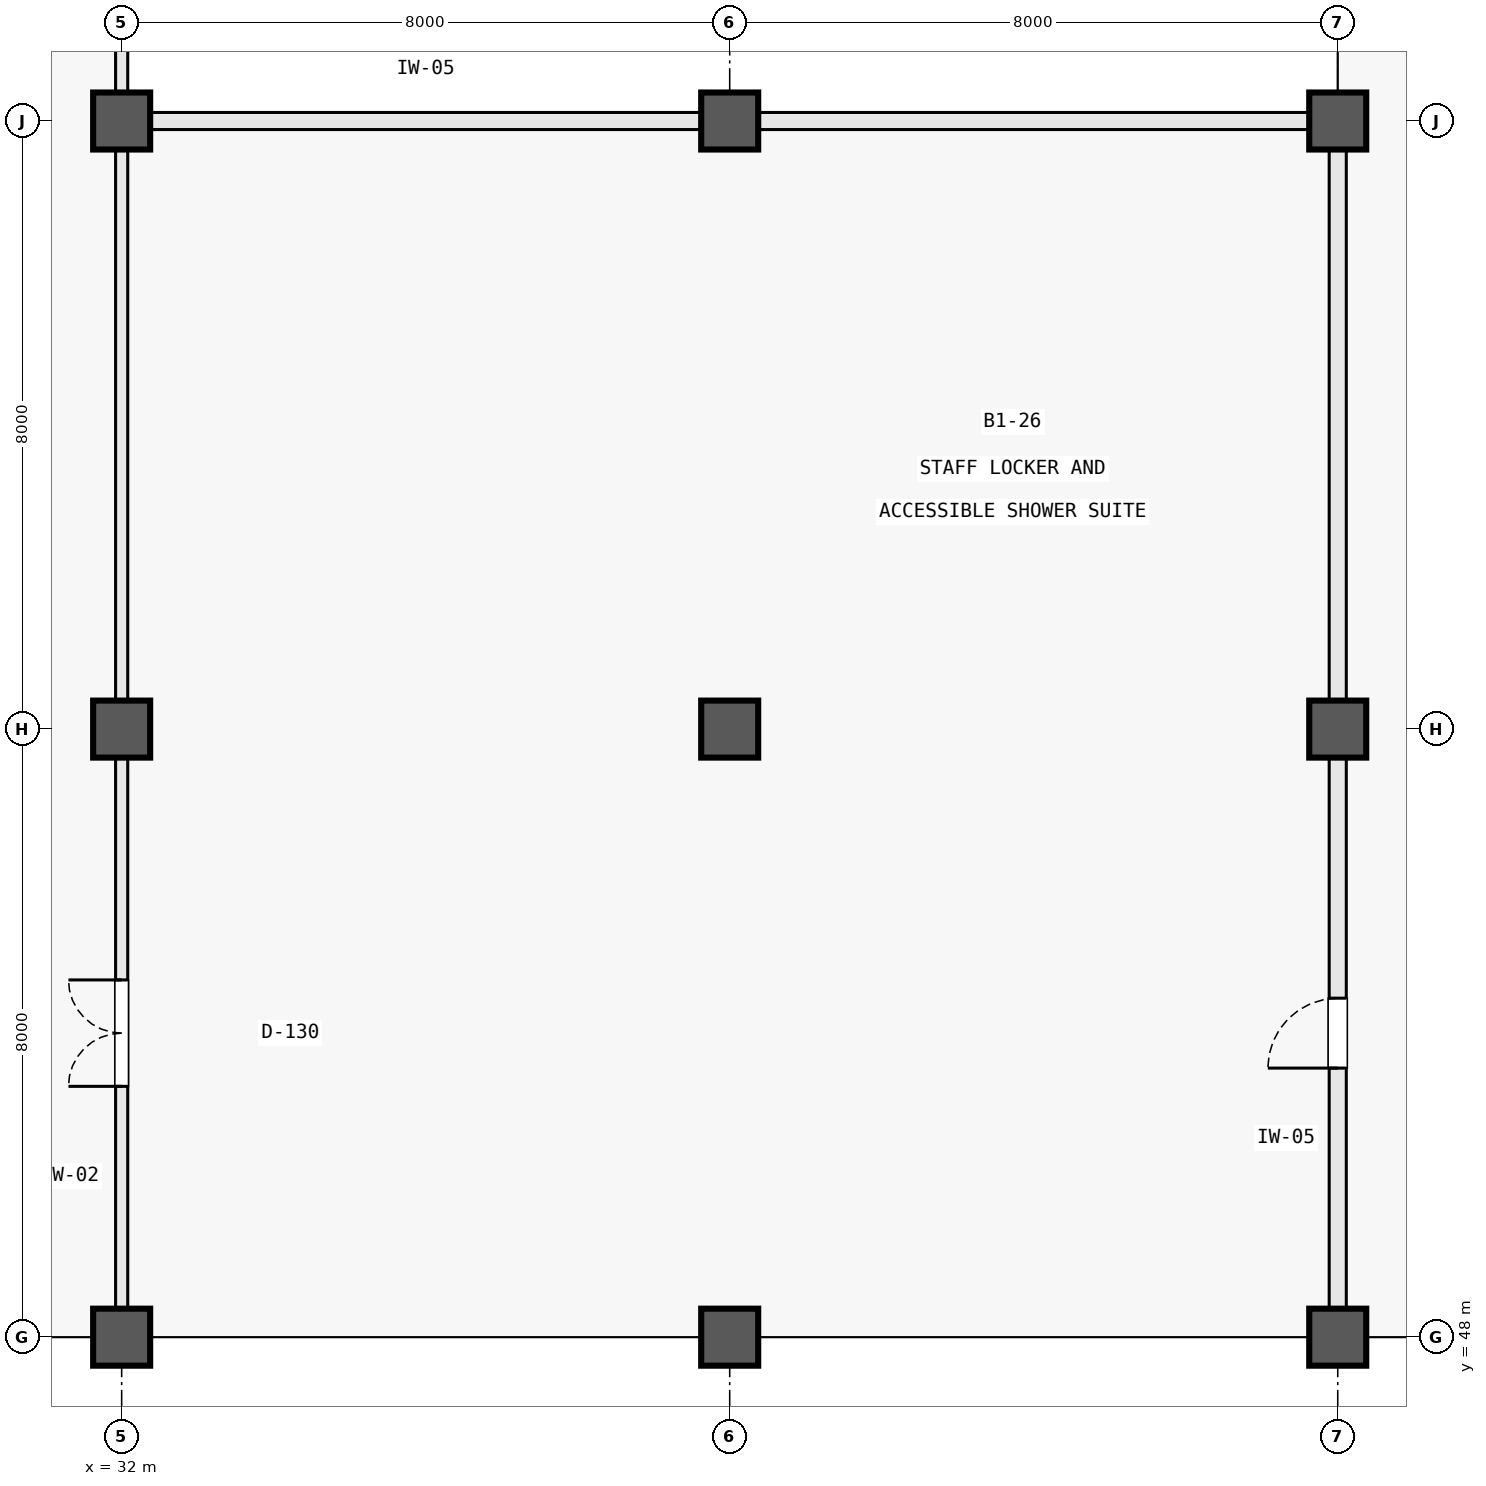
"""IFC4 building model, lengths in metres.
Left out: names, types, materials, properties, quantities, classifications, styles, units other than length and angle.
Written with IfcOpenShell. Run it as: python <this file> out.ifc"""

import sys

from ifc_helpers import new_model, si_unit, direction, frame, frame_2d, origin, origin_2d, place, context, subcontext, project, spatial, rectangle, extrude, element, fill, save


model = new_model("IFC4")
c1 = context("Model", 3, precision=1e-05, world=origin(), true_north=direction((0.0, 1.0)))
c2 = subcontext(c1, "Body", "Model", "MODEL_VIEW")
j1 = project(units=[si_unit("LENGTHUNIT", "METRE"), si_unit("PLANEANGLEUNIT", "RADIAN")], contexts=[c1])
p1 = place(None, origin())
s1 = spatial("IfcSite", under=j1, at=p1, CompositionType="ELEMENT")
p2 = place(p1, origin())
s2 = spatial("IfcBuilding", under=s1, at=p2, CompositionType="ELEMENT")
p3 = place(p2, frame((0.0, 0.0, -5.4)))
s3 = spatial("IfcBuildingStorey", under=s2, at=p3, CompositionType="ELEMENT", Elevation=-5.4)
for number, where, z_axis, x_axis in (
    (1, (32.0, 48.0, 0.0), (0.0, 0.0, 1.0), (1.0, 0.0, 0.0)),
    (2, (32.0, 56.0, 0.0), (0.0, 0.0, 1.0), (1.0, 0.0, 0.0)),
    (3, (32.0, 64.0, 0.0), (0.0, 0.0, 1.0), (1.0, 0.0, 0.0)),
    (4, (40.0, 48.0, 0.0), (0.0, 0.0, 1.0), (1.0, 0.0, 0.0)),
    (5, (40.0, 56.0, 0.0), (0.0, 0.0, 1.0), (1.0, 0.0, 0.0)),
    (6, (40.0, 64.0, 0.0), (0.0, 0.0, 1.0), (1.0, 0.0, 0.0)),
    (7, (48.0, 48.0, 0.0), (0.0, 0.0, 1.0), (1.0, 0.0, 0.0)),
    (8, (48.0, 56.0, 0.0), (0.0, 0.0, 1.0), (1.0, 0.0, 0.0)),
    (9, (48.0, 64.0, 0.0), (0.0, 0.0, 1.0), (1.0, 0.0, 0.0)),
):
    element("IfcColumn", number, at=place(p3, frame(where, z_axis=z_axis, x_axis=x_axis)), inside=s3, PredefinedType="COLUMN", context=c2, shape_type="SweptSolid", body=[
        extrude(rectangle(XDim=0.75, YDim=0.75, at=origin_2d()), origin(), (0.0, 0.0, 1.0), 5.4),
    ])
p4 = place(p3, frame((32.0, 48.385, 0.0), z_axis=(0.0, 0.0, 1.0), x_axis=(0.0, 1.0, 0.0)))
e10 = element("IfcWall", 10, at=p4, inside=s3, PredefinedType="PARTITIONING", context=c2, shape_type="SweptSolid", body=[
    extrude(rectangle(XDim=7.23, YDim=0.16, at=frame_2d((3.615, 0.0))), origin(), (0.0, 0.0, 1.0), 3.83),
])
p5 = place(p4, frame((2.915, 0.0, 0.0)))
e11 = element("IfcOpeningElement", 11, at=p5, cuts=e10, PredefinedType="OPENING", context=c2, shape_type="SweptSolid", body=[
    extrude(rectangle(XDim=1.4, YDim=2.2, at=frame_2d((0.7, 1.1))), frame((0.0, 0.092, 0.0), z_axis=(0.0, -1.0, 0.0), x_axis=(1.0, 0.0, 0.0)), (0.0, 0.0, 1.0), 0.184),
])
p6 = place(p3, frame((32.0, 56.385, 0.0), z_axis=(0.0, 0.0, 1.0), x_axis=(0.0, 1.0, 0.0)))
e12 = element("IfcWall", 12, at=p6, inside=s3, PredefinedType="PARTITIONING", context=c2, shape_type="SweptSolid", body=[
    extrude(rectangle(XDim=7.23, YDim=0.16, at=frame_2d((3.615, 0.0))), origin(), (0.0, 0.0, 1.0), 3.83),
])
p7 = place(p3, frame((32.0, 64.385, 0.0), z_axis=(0.0, 0.0, 1.0), x_axis=(0.0, 1.0, 0.0)))
e13 = element("IfcWall", 13, at=p7, inside=s3, PredefinedType="PARTITIONING", context=c2, shape_type="SweptSolid", body=[
    extrude(rectangle(XDim=9.23, YDim=0.16, at=frame_2d((4.615, 0.0))), origin(), (0.0, 0.0, 1.0), 3.83),
])
p8 = place(p3, frame((48.0, 48.385, 0.0), z_axis=(0.0, 0.0, 1.0), x_axis=(0.0, 1.0, 0.0)))
e14 = element("IfcWall", 14, at=p8, inside=s3, PredefinedType="PARTITIONING", context=c2, shape_type="SweptSolid", body=[
    extrude(rectangle(XDim=7.23, YDim=0.225, at=frame_2d((3.615, 0.0))), origin(), (0.0, 0.0, 1.0), 3.83),
])
p9 = place(p8, frame((3.155, 0.0, 0.0)))
e15 = element("IfcOpeningElement", 15, at=p9, cuts=e14, PredefinedType="OPENING", context=c2, shape_type="SweptSolid", body=[
    extrude(rectangle(XDim=0.92, YDim=2.1, at=frame_2d((0.46, 1.05))), frame((0.0, 0.125, 0.0), z_axis=(0.0, -1.0, 0.0), x_axis=(1.0, 0.0, 0.0)), (0.0, 0.0, 1.0), 0.249),
])
for number, where, z_axis, x_axis in (
    (16, (48.0, 56.385, 0.0), (0.0, 0.0, 1.0), (0.0, 1.0, 0.0)),
    (17, (32.385, 64.0, 0.0), (0.0, 0.0, 1.0), (1.0, 0.0, 0.0)),
    (18, (40.385, 64.0, 0.0), (0.0, 0.0, 1.0), (1.0, 0.0, 0.0)),
):
    element("IfcWall", number, at=place(p3, frame(where, z_axis=z_axis, x_axis=x_axis)), inside=s3, PredefinedType="PARTITIONING", context=c2, shape_type="SweptSolid", body=[
        extrude(rectangle(XDim=7.23, YDim=0.225, at=frame_2d((3.615, 0.0))), origin(), (0.0, 0.0, 1.0), 3.83),
    ])
p10 = place(p5, origin())
e19 = element("IfcDoor", 19, at=p10, inside=s3, OperationType="DOUBLE_DOOR_SINGLE_SWING", PredefinedType="DOOR", context=c2, shape_type="SweptSolid", body=[
    extrude(rectangle(XDim=1.4, YDim=2.2, at=frame_2d((0.7, 1.1))), frame((0.0, 0.025, 0.0), z_axis=(0.0, -1.0, 0.0), x_axis=(1.0, 0.0, 0.0)), (0.0, 0.0, 1.0), 0.05),
])
fill(e11, e19)
p11 = place(p9, origin())
e20 = element("IfcDoor", 20, at=p11, inside=s3, OperationType="SINGLE_SWING_LEFT", PredefinedType="DOOR", context=c2, shape_type="SweptSolid", body=[
    extrude(rectangle(XDim=0.92, YDim=2.1, at=frame_2d((0.46, 1.05))), frame((0.0, 0.025, 0.0), z_axis=(0.0, -1.0, 0.0), x_axis=(1.0, 0.0, 0.0)), (0.0, 0.0, 1.0), 0.05),
])
fill(e15, e20)
save(model, sys.argv[1])
